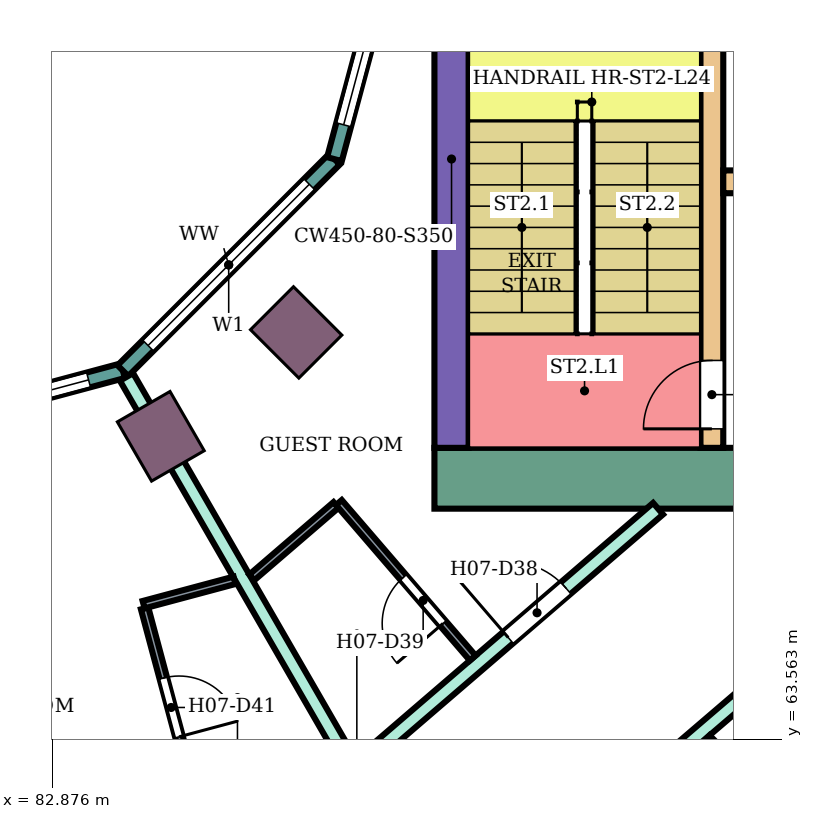
"""IFC4 building model, lengths in metres.
Left out: names, types, materials, properties, quantities, classifications, styles, units other than length and angle.
Written with IfcOpenShell. Run it as: python <this file> out.ifc"""

import sys

from ifc_helpers import new_model, si_unit, direction, frame, frame_2d, origin, origin_2d, place, context, subcontext, project, spatial, rectangle, extrude, element, fill, save


model = new_model("IFC4")
c1 = context("Model", 3, precision=1e-05, world=origin(), true_north=direction((0.0, 1.0)))
c2 = subcontext(c1, "Body", "Model", "MODEL_VIEW")
j1 = project(units=[si_unit("LENGTHUNIT", "METRE"), si_unit("PLANEANGLEUNIT", "RADIAN")], contexts=[c1])
p1 = place(None, origin())
s1 = spatial("IfcSite", under=j1, at=p1, CompositionType="ELEMENT")
p2 = place(p1, origin())
s2 = spatial("IfcBuilding", under=s1, at=p2, CompositionType="ELEMENT")
p3 = place(p2, frame((0.0, 0.0, 105.2)))
s3 = spatial("IfcBuildingStorey", under=s2, at=p3, CompositionType="ELEMENT", Elevation=105.2)
for number, where, z_axis, x_axis in (
    (1, (84.3, 67.552, 0.0), (0.0, 0.0, 1.0), (0.5, -0.866, 0.0)),
    (2, (86.081, 68.919, 0.0), (0.0, 0.0, 1.0), (0.707, -0.707, 0.0)),
):
    element("IfcColumn", number, at=place(p3, frame(where, z_axis=z_axis, x_axis=x_axis)), inside=s3, PredefinedType="COLUMN", context=c2, shape_type="SweptSolid", body=[
        extrude(rectangle(XDim=0.9, YDim=0.8, at=origin_2d()), origin(), (0.0, 0.0, 1.0), 3.8),
    ])
p4 = place(p3, frame((87.9, 67.0, 0.0), z_axis=(0.0, 0.0, 1.0), x_axis=(1.0, 0.0, 0.0)))
e3 = element("IfcWall", 3, at=p4, inside=s3, PredefinedType="SHEAR", context=c2, shape_type="SweptSolid", body=[
    extrude(rectangle(XDim=14.7, YDim=0.8, at=frame_2d((7.35, 0.0))), origin(), (0.0, 0.0, 1.0), 3.45),
])
p5 = place(p4, frame((4.2, 0.0, 0.0)))
e4 = element("IfcOpeningElement", 4, at=p5, cuts=e3, PredefinedType="OPENING", context=c2, shape_type="SweptSolid", body=[
    extrude(rectangle(XDim=2.4, YDim=2.4, at=frame_2d((1.2, 1.2))), frame((0.0, 0.41, 0.0), z_axis=(0.0, -1.0, 0.0), x_axis=(1.0, 0.0, 0.0)), (0.0, 0.0, 1.0), 0.82),
])
p6 = place(p3, frame((88.125, 67.4, 0.0), z_axis=(0.0, 0.0, 1.0), x_axis=(0.0, 1.0, 0.0)))
e5 = element("IfcWall", 5, at=p6, inside=s3, PredefinedType="SHEAR", context=c2, shape_type="SweptSolid", body=[
    extrude(rectangle(XDim=7.6, YDim=0.45, at=frame_2d((3.8, 0.0))), origin(), (0.0, 0.0, 1.0), 3.45),
])
p7 = place(p3, frame((91.55, 67.4, 0.0), z_axis=(0.0, 0.0, 1.0), x_axis=(0.0, 1.0, 0.0)))
e6 = element("IfcWall", 6, at=p7, inside=s3, PredefinedType="SHEAR", context=c2, shape_type="SweptSolid", body=[
    extrude(rectangle(XDim=7.6, YDim=0.3, at=frame_2d((3.8, 0.0))), origin(), (0.0, 0.0, 1.0), 3.45),
])
p8 = place(p7, frame((0.25, 0.0, 0.0)))
e7 = element("IfcOpeningElement", 7, at=p8, cuts=e6, PredefinedType="OPENING", context=c2, shape_type="SweptSolid", body=[
    extrude(rectangle(XDim=0.9, YDim=2.1, at=frame_2d((0.45, 1.05))), frame((0.0, 0.16, 0.0), z_axis=(0.0, -1.0, 0.0), x_axis=(1.0, 0.0, 0.0)), (0.0, 0.0, 1.0), 0.32),
])
p9 = place(p3, frame((91.7, 70.9, 0.0), z_axis=(0.0, 0.0, 1.0), x_axis=(1.0, 0.0, 0.0)))
e8 = element("IfcWall", 8, at=p9, inside=s3, PredefinedType="SHEAR", context=c2, shape_type="SweptSolid", body=[
    extrude(rectangle(XDim=10.9, YDim=0.3, at=frame_2d((5.45, 0.0))), origin(), (0.0, 0.0, 1.0), 3.45),
])
p10 = place(p9, frame((0.4, 0.0, 0.0)))
e9 = element("IfcOpeningElement", 9, at=p10, cuts=e8, PredefinedType="OPENING", context=c2, shape_type="SweptSolid", body=[
    extrude(rectangle(XDim=1.4, YDim=2.1, at=frame_2d((0.7, 1.05))), frame((0.0, 0.16, 0.0), z_axis=(0.0, -1.0, 0.0), x_axis=(1.0, 0.0, 0.0)), (0.0, 0.0, 1.0), 0.32),
])
p11 = place(p9, frame((5.4, 0.0, 0.0)))
e10 = element("IfcOpeningElement", 10, at=p11, cuts=e8, PredefinedType="OPENING", context=c2, shape_type="SweptSolid", body=[
    extrude(rectangle(XDim=1.4, YDim=2.1, at=frame_2d((0.7, 1.05))), frame((0.0, 0.16, 0.0), z_axis=(0.0, -1.0, 0.0), x_axis=(1.0, 0.0, 0.0)), (0.0, 0.0, 1.0), 0.32),
])
p12 = place(p9, frame((8.1, 0.0, 0.0)))
e11 = element("IfcOpeningElement", 11, at=p12, cuts=e8, PredefinedType="OPENING", context=c2, shape_type="SweptSolid", body=[
    extrude(rectangle(XDim=1.0, YDim=2.1, at=frame_2d((0.5, 1.05))), frame((0.0, 0.16, 0.0), z_axis=(0.0, -1.0, 0.0), x_axis=(1.0, 0.0, 0.0)), (0.0, 0.0, 1.0), 0.32),
])
p13 = place(p3, frame((80.0, 67.396, 0.0), z_axis=(0.0, 0.0, 1.0), x_axis=(0.965933654434, 0.258789828301, 0.0)))
e12 = element("IfcWall", 12, at=p13, inside=s3, PredefinedType="NOTDEFINED", context=c2, shape_type="SweptSolid", body=[
    extrude(rectangle(XDim=3.936, YDim=0.2, at=frame_2d((1.968, 0.0))), origin(), (0.0, 0.0, 1.0), 3.8),
])
p14 = place(p13, frame((0.468, 0.0, 0.9)))
e13 = element("IfcOpeningElement", 13, at=p14, cuts=e12, PredefinedType="OPENING", context=c2, shape_type="SweptSolid", body=[
    extrude(rectangle(XDim=3.0, YDim=2.3, at=frame_2d((1.5, 1.15))), frame((0.0, 0.11, 0.0), z_axis=(0.0, -1.0, 0.0), x_axis=(1.0, 0.0, 0.0)), (0.0, 0.0, 1.0), 0.22),
])
p15 = place(p3, frame((83.802, 68.415, 0.0), z_axis=(0.0, 0.0, 1.0), x_axis=(0.707106781187, 0.707106781187, 0.0)))
e14 = element("IfcWall", 14, at=p15, inside=s3, PredefinedType="NOTDEFINED", context=c2, shape_type="SweptSolid", body=[
    extrude(rectangle(XDim=3.936, YDim=0.2, at=frame_2d((1.968, 0.0))), origin(), (0.0, 0.0, 1.0), 3.8),
])
p16 = place(p15, frame((0.468, 0.0, 0.9)))
e15 = element("IfcOpeningElement", 15, at=p16, cuts=e14, PredefinedType="OPENING", context=c2, shape_type="SweptSolid", body=[
    extrude(rectangle(XDim=3.0, YDim=2.3, at=frame_2d((1.5, 1.15))), frame((0.0, 0.11, 0.0), z_axis=(0.0, -1.0, 0.0), x_axis=(1.0, 0.0, 0.0)), (0.0, 0.0, 1.0), 0.22),
])
p17 = place(p3, frame((86.585, 71.198, 0.0), z_axis=(0.0, 0.0, 1.0), x_axis=(0.258789828301, 0.965933654434, 0.0)))
e16 = element("IfcWall", 16, at=p17, inside=s3, PredefinedType="NOTDEFINED", context=c2, shape_type="SweptSolid", body=[
    extrude(rectangle(XDim=3.936, YDim=0.2, at=frame_2d((1.968, 0.0))), origin(), (0.0, 0.0, 1.0), 3.8),
])
p18 = place(p17, frame((0.468, 0.0, 0.9)))
e17 = element("IfcOpeningElement", 17, at=p18, cuts=e16, PredefinedType="OPENING", context=c2, shape_type="SweptSolid", body=[
    extrude(rectangle(XDim=3.0, YDim=2.3, at=frame_2d((1.5, 1.15))), frame((0.0, 0.11, 0.0), z_axis=(0.0, -1.0, 0.0), x_axis=(1.0, 0.0, 0.0)), (0.0, 0.0, 1.0), 0.22),
])
p19 = place(p3, frame((83.849, 68.333, 0.0), z_axis=(0.0, 0.0, 1.0), x_axis=(0.499901724708, -0.866082135617, 0.0)))
e18 = element("IfcWall", 18, at=p19, inside=s3, PredefinedType="PARTITIONING", context=c2, shape_type="SweptSolid", body=[
    extrude(rectangle(XDim=5.855, YDim=0.2, at=frame_2d((2.928, 0.0))), origin(), (0.0, 0.0, 1.0), 3.35),
])
p20 = place(p3, frame((86.877, 63.189, 0.0), z_axis=(0.0, 0.0, 1.0), x_axis=(0.758164888471, 0.652062881853, 0.0)))
e19 = element("IfcWall", 19, at=p20, inside=s3, PredefinedType="PARTITIONING", context=c2, shape_type="SweptSolid", body=[
    extrude(rectangle(XDim=5.23, YDim=0.2, at=frame_2d((2.615, 0.0))), origin(), (0.0, 0.0, 1.0), 3.35),
])
p21 = place(p20, frame((2.63, 0.0, 0.0)))
e20 = element("IfcOpeningElement", 20, at=p21, cuts=e19, PredefinedType="OPENING", context=c2, shape_type="SweptSolid", body=[
    extrude(rectangle(XDim=1.0, YDim=2.1, at=frame_2d((0.5, 1.05))), frame((0.0, 0.11, 0.0), z_axis=(0.0, -1.0, 0.0), x_axis=(1.0, 0.0, 0.0)), (0.0, 0.0, 1.0), 0.22),
])
p22 = place(p3, frame((88.119, 60.835, 0.0), z_axis=(0.0, 0.0, 1.0), x_axis=(0.759278362444, 0.650765985838, 0.0)))
e21 = element("IfcWall", 21, at=p22, inside=s3, PredefinedType="PARTITIONING", context=c2, shape_type="SweptSolid", body=[
    extrude(rectangle(XDim=6.336, YDim=0.2, at=frame_2d((3.168, 0.0))), origin(), (0.0, 0.0, 1.0), 3.35),
])
p23 = place(p3, frame((91.449, 63.547, 0.0), z_axis=(0.0, 0.0, 1.0), x_axis=(0.706984798626, -0.707228742708, 0.0)))
e22 = element("IfcWall", 22, at=p23, inside=s3, PredefinedType="PARTITIONING", context=c2, shape_type="SweptSolid", body=[
    extrude(rectangle(XDim=7.006, YDim=0.2, at=frame_2d((3.503, 0.0))), origin(), (0.0, 0.0, 1.0), 3.35),
])
p24 = place(p3, frame((84.087, 65.289, 0.0), z_axis=(0.0, 0.0, 1.0), x_axis=(0.258929459649, -0.965896234037, 0.0)))
e23 = element("IfcWall", 23, at=p24, inside=s3, PredefinedType="PARTITIONING", context=c2, shape_type="SweptSolid", body=[
    extrude(rectangle(XDim=2.65, YDim=0.1, at=frame_2d((1.325, 0.0))), origin(), (0.0, 0.0, 1.0), 3.35),
])
p25 = place(p24, frame((0.95, 0.0, 0.0)))
e24 = element("IfcOpeningElement", 24, at=p25, cuts=e23, PredefinedType="OPENING", context=c2, shape_type="SweptSolid", body=[
    extrude(rectangle(XDim=0.8, YDim=2.1, at=frame_2d((0.4, 1.05))), frame((0.0, 0.06, 0.0), z_axis=(0.0, -1.0, 0.0), x_axis=(1.0, 0.0, 0.0)), (0.0, 0.0, 1.0), 0.12),
])
p26 = place(p3, frame((84.074, 65.337, 0.0), z_axis=(0.0, 0.0, 1.0), x_axis=(0.965949810352, 0.258729518766, 0.0)))
e25 = element("IfcWall", 25, at=p26, inside=s3, PredefinedType="PARTITIONING", context=c2, shape_type="SweptSolid", body=[
    extrude(rectangle(XDim=1.239, YDim=0.1, at=frame_2d((0.62, 0.0))), origin(), (0.0, 0.0, 1.0), 3.35),
])
p27 = place(p3, frame((85.497, 65.696, 0.0), z_axis=(0.0, 0.0, 1.0), x_axis=(0.75817032582, 0.652056559698, 0.0)))
e26 = element("IfcWall", 26, at=p27, inside=s3, PredefinedType="PARTITIONING", context=c2, shape_type="SweptSolid", body=[
    extrude(rectangle(XDim=1.461, YDim=0.1, at=frame_2d((0.73, 0.0))), origin(), (0.0, 0.0, 1.0), 3.35),
])
p28 = place(p3, frame((86.643, 66.681, 0.0), z_axis=(0.0, 0.0, 1.0), x_axis=(0.652264876065, -0.757991115682, 0.0)))
e27 = element("IfcWall", 27, at=p28, inside=s3, PredefinedType="PARTITIONING", context=c2, shape_type="SweptSolid", body=[
    extrude(rectangle(XDim=2.699, YDim=0.1, at=frame_2d((1.35, 0.0))), origin(), (0.0, 0.0, 1.0), 3.35),
])
p29 = place(p28, frame((1.3, 0.0, 0.0)))
e28 = element("IfcOpeningElement", 28, at=p29, cuts=e27, PredefinedType="OPENING", context=c2, shape_type="SweptSolid", body=[
    extrude(rectangle(XDim=0.8, YDim=2.1, at=frame_2d((0.4, 1.05))), frame((0.0, 0.06, 0.0), z_axis=(0.0, -1.0, 0.0), x_axis=(1.0, 0.0, 0.0)), (0.0, 0.0, 1.0), 0.12),
])
p30 = place(p14, origin())
e29 = element("IfcWindow", 29, at=p30, inside=s3, PartitioningType="SINGLE_PANEL", PredefinedType="WINDOW", context=c2, shape_type="SweptSolid", body=[
    extrude(rectangle(XDim=3.0, YDim=2.3, at=frame_2d((1.5, 1.15))), frame((0.0, 0.03, 0.0), z_axis=(0.0, -1.0, 0.0), x_axis=(1.0, 0.0, 0.0)), (0.0, 0.0, 1.0), 0.06),
])
fill(e13, e29)
p31 = place(p16, origin())
e30 = element("IfcWindow", 30, at=p31, inside=s3, PartitioningType="SINGLE_PANEL", PredefinedType="WINDOW", context=c2, shape_type="SweptSolid", body=[
    extrude(rectangle(XDim=3.0, YDim=2.3, at=frame_2d((1.5, 1.15))), frame((0.0, 0.03, 0.0), z_axis=(0.0, -1.0, 0.0), x_axis=(1.0, 0.0, 0.0)), (0.0, 0.0, 1.0), 0.06),
])
fill(e15, e30)
p32 = place(p18, origin())
e31 = element("IfcWindow", 31, at=p32, inside=s3, PartitioningType="SINGLE_PANEL", PredefinedType="WINDOW", context=c2, shape_type="SweptSolid", body=[
    extrude(rectangle(XDim=3.0, YDim=2.3, at=frame_2d((1.5, 1.15))), frame((0.0, 0.03, 0.0), z_axis=(0.0, -1.0, 0.0), x_axis=(1.0, 0.0, 0.0)), (0.0, 0.0, 1.0), 0.06),
])
fill(e17, e31)
p33 = place(p21, origin())
e32 = element("IfcDoor", 32, at=p33, inside=s3, OperationType="SINGLE_SWING_LEFT", PredefinedType="DOOR", context=c2, shape_type="SweptSolid", body=[
    extrude(rectangle(XDim=1.0, YDim=2.1, at=frame_2d((0.5, 1.05))), frame((0.0, 0.025, 0.0), z_axis=(0.0, -1.0, 0.0), x_axis=(1.0, 0.0, 0.0)), (0.0, 0.0, 1.0), 0.05),
])
fill(e20, e32)
p34 = place(p29, frame((0.8, 0.0, 0.0), z_axis=(0.0, 0.0, 1.0), x_axis=(-1.0, 0.0, 0.0)))
e33 = element("IfcDoor", 33, at=p34, inside=s3, OperationType="SINGLE_SWING_LEFT", PredefinedType="DOOR", context=c2, shape_type="SweptSolid", body=[
    extrude(rectangle(XDim=0.8, YDim=2.1, at=frame_2d((0.4, 1.05))), frame((0.0, 0.025, 0.0), z_axis=(0.0, -1.0, 0.0), x_axis=(1.0, 0.0, 0.0)), (0.0, 0.0, 1.0), 0.05),
])
fill(e28, e33)
p35 = place(p25, origin())
e34 = element("IfcDoor", 34, at=p35, inside=s3, OperationType="SINGLE_SWING_RIGHT", PredefinedType="DOOR", context=c2, shape_type="SweptSolid", body=[
    extrude(rectangle(XDim=0.8, YDim=2.1, at=frame_2d((0.4, 1.05))), frame((0.0, 0.025, 0.0), z_axis=(0.0, -1.0, 0.0), x_axis=(1.0, 0.0, 0.0)), (0.0, 0.0, 1.0), 0.05),
])
fill(e24, e34)
p36 = place(p8, origin())
e35 = element("IfcDoor", 35, at=p36, inside=s3, OperationType="SINGLE_SWING_LEFT", PredefinedType="DOOR", context=c2, shape_type="SweptSolid", body=[
    extrude(rectangle(XDim=0.9, YDim=2.1, at=frame_2d((0.45, 1.05))), frame((0.0, 0.025, 0.0), z_axis=(0.0, -1.0, 0.0), x_axis=(1.0, 0.0, 0.0)), (0.0, 0.0, 1.0), 0.05),
])
fill(e7, e35)
save(model, sys.argv[1])
